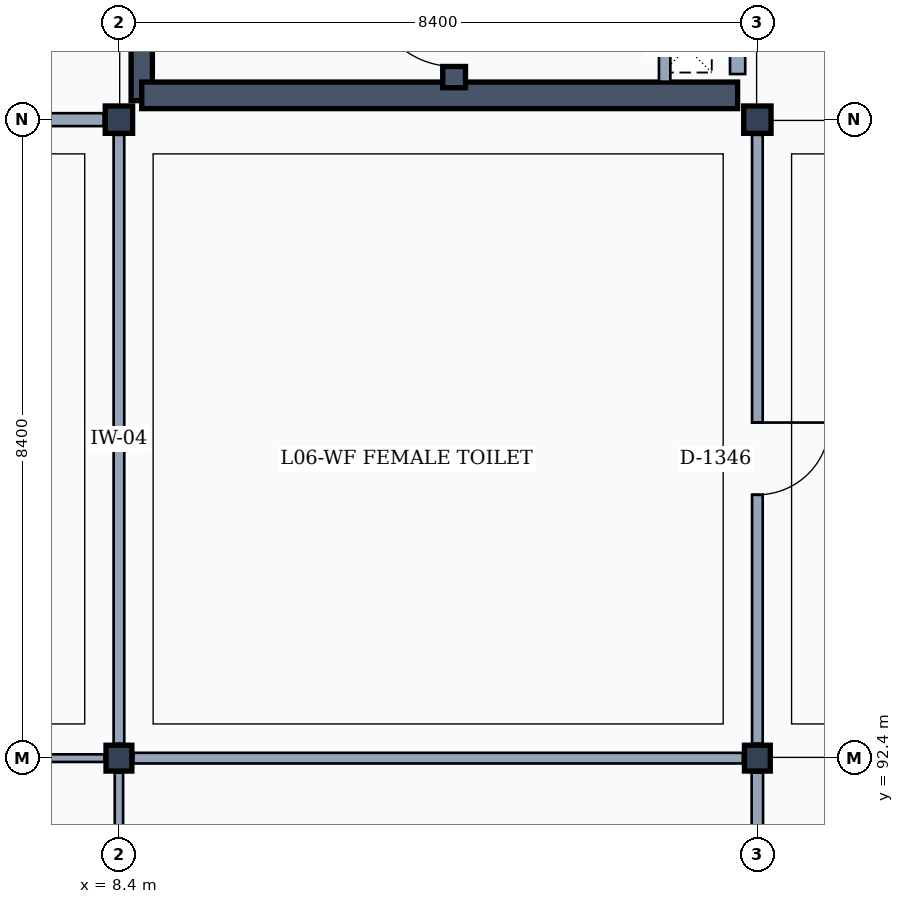
"""IFC4 building model, lengths in metres.
Left out: names, types, materials, properties, quantities, classifications, styles, units other than length and angle.
Written with IfcOpenShell. Run it as: python <this file> out.ifc"""

import sys

from ifc_helpers import new_model, si_unit, direction, frame, frame_2d, origin, origin_2d, place, context, subcontext, project, spatial, rectangle, extrude, element, fill, save


model = new_model("IFC4")
c1 = context("Model", 3, precision=1e-05, world=origin(), true_north=direction((0.0, 1.0)))
c2 = subcontext(c1, "Body", "Model", "MODEL_VIEW")
j1 = project(units=[si_unit("LENGTHUNIT", "METRE"), si_unit("PLANEANGLEUNIT", "RADIAN")], contexts=[c1])
p1 = place(None, origin())
s1 = spatial("IfcSite", under=j1, at=p1, CompositionType="ELEMENT")
p2 = place(p1, origin())
s2 = spatial("IfcBuilding", under=s1, at=p2, CompositionType="ELEMENT")
p3 = place(p2, frame((0.0, 0.0, 26.4)))
s3 = spatial("IfcBuildingStorey", under=s2, at=p3, CompositionType="ELEMENT", Elevation=26.4)
p4 = place(p3, frame((8.4, 92.4, 0.0), z_axis=(0.0, 0.0, 1.0), x_axis=(1.0, 0.0, 0.0)))
e1 = element("IfcColumn", 1, at=p4, inside=s3, PredefinedType="COLUMN", context=c2, shape_type="SweptSolid", body=[
    extrude(rectangle(XDim=0.34, YDim=0.34, at=origin_2d()), origin(), (0.0, 0.0, 1.0), 4.2),
])
p5 = place(p3, frame((8.4, 100.8, 0.0), z_axis=(0.0, 0.0, 1.0), x_axis=(1.0, 0.0, 0.0)))
e2 = element("IfcColumn", 2, at=p5, inside=s3, PredefinedType="COLUMN", context=c2, shape_type="SweptSolid", body=[
    extrude(rectangle(XDim=0.36, YDim=0.36, at=origin_2d()), origin(), (0.0, 0.0, 1.0), 4.2),
])
p6 = place(p3, frame((16.8, 92.4, 0.0), z_axis=(0.0, 0.0, 1.0), x_axis=(1.0, 0.0, 0.0)))
e3 = element("IfcColumn", 3, at=p6, inside=s3, PredefinedType="COLUMN", context=c2, shape_type="SweptSolid", body=[
    extrude(rectangle(XDim=0.34, YDim=0.34, at=origin_2d()), origin(), (0.0, 0.0, 1.0), 4.2),
])
p7 = place(p3, frame((16.8, 100.8, 0.0), z_axis=(0.0, 0.0, 1.0), x_axis=(1.0, 0.0, 0.0)))
e4 = element("IfcColumn", 4, at=p7, inside=s3, PredefinedType="COLUMN", context=c2, shape_type="SweptSolid", body=[
    extrude(rectangle(XDim=0.36, YDim=0.36, at=origin_2d()), origin(), (0.0, 0.0, 1.0), 4.2),
])
p8 = place(p3, frame((8.7, 101.05, 0.0), z_axis=(0.0, 0.0, 1.0), x_axis=(0.0, 1.0, 0.0)))
e5 = element("IfcWall", 5, at=p8, inside=s3, PredefinedType="SHEAR", context=c2, shape_type="SweptSolid", body=[
    extrude(rectangle(XDim=7.94, YDim=0.28, at=frame_2d((3.97, 0.0))), origin(), (0.0, 0.0, 1.0), 3.99),
])
p9 = place(p3, frame((16.54, 108.6, 0.0), z_axis=(0.0, 0.0, 1.0), x_axis=(0.0, -1.0, 0.0)))
e6 = element("IfcWall", 6, at=p9, inside=s3, PredefinedType="PARTITIONING", context=c2, shape_type="SweptSolid", body=[
    extrude(rectangle(XDim=7.2, YDim=0.2, at=frame_2d((3.6, 0.0))), origin(), (0.0, 0.0, 1.0), 3.32),
])
p10 = place(p9, frame((3.55, 0.0, 0.0)))
e7 = element("IfcOpeningElement", 7, at=p10, cuts=e6, PredefinedType="OPENING", context=c2, shape_type="SweptSolid", body=[
    extrude(rectangle(XDim=1.1, YDim=2.15, at=frame_2d((0.55, 1.075))), frame((0.0, 0.11, 0.0), z_axis=(0.0, -1.0, 0.0), x_axis=(1.0, 0.0, 0.0)), (0.0, 0.0, 1.0), 0.22),
])
p11 = place(p3, frame((16.54, 101.12, 0.0), z_axis=(0.0, 0.0, 1.0), x_axis=(-1.0, 0.0, 0.0)))
e8 = element("IfcWall", 8, at=p11, inside=s3, PredefinedType="SHEAR", context=c2, shape_type="SweptSolid", body=[
    extrude(rectangle(XDim=7.84, YDim=0.35, at=frame_2d((3.92, 0.0))), origin(), (0.0, 0.0, 1.0), 3.99),
])
p12 = place(p3, frame((12.81, 101.22, 0.0), z_axis=(0.0, 0.0, 1.0), x_axis=(0.0, 1.0, 0.0)))
e9 = element("IfcWall", 9, at=p12, inside=s3, PredefinedType="SHEAR", context=c2, shape_type="SweptSolid", body=[
    extrude(rectangle(XDim=7.38, YDim=0.3, at=frame_2d((3.69, 0.0))), origin(), (0.0, 0.0, 1.0), 3.99),
])
p13 = place(p12, frame((0.28, 0.0, 0.0)))
e10 = element("IfcOpeningElement", 10, at=p13, cuts=e9, PredefinedType="OPENING", context=c2, shape_type="SweptSolid", body=[
    extrude(rectangle(XDim=1.1, YDim=2.15, at=frame_2d((0.55, 1.075))), frame((0.0, 0.16, 0.0), z_axis=(0.0, -1.0, 0.0), x_axis=(1.0, 0.0, 0.0)), (0.0, 0.0, 1.0), 0.32),
])
p14 = place(p3, frame((15.58, 102.36, 0.0), z_axis=(0.0, 0.0, 1.0), x_axis=(0.0, -1.0, 0.0)))
e11 = element("IfcWall", 11, at=p14, inside=s3, PredefinedType="PARTITIONING", context=c2, shape_type="SweptSolid", body=[
    extrude(rectangle(XDim=1.06, YDim=0.15, at=frame_2d((0.53, 0.0))), origin(), (0.0, 0.0, 1.0), 3.32),
])
p15 = place(p3, frame((8.4, 84.2, 0.0), z_axis=(0.0, 0.0, 1.0), x_axis=(0.0, 1.0, 0.0)))
e12 = element("IfcWall", 12, at=p15, inside=s3, PredefinedType="PARTITIONING", context=c2, shape_type="SweptSolid", body=[
    extrude(rectangle(XDim=8.01, YDim=0.11, at=frame_2d((4.005, 0.0))), origin(), (0.0, 0.0, 1.0), 3.32),
])
p16 = place(p15, frame((3.3, 0.0, 0.0)))
e13 = element("IfcOpeningElement", 13, at=p16, cuts=e12, PredefinedType="OPENING", context=c2, shape_type="SweptSolid", body=[
    extrude(rectangle(XDim=0.9, YDim=2.1, at=frame_2d((0.45, 1.05))), frame((0.0, 0.065, 0.0), z_axis=(0.0, -1.0, 0.0), x_axis=(1.0, 0.0, 0.0)), (0.0, 0.0, 1.0), 0.13),
])
p17 = place(p3, frame((0.19, 92.4, 0.0), z_axis=(0.0, 0.0, 1.0), x_axis=(1.0, 0.0, 0.0)))
e14 = element("IfcWall", 14, at=p17, inside=s3, PredefinedType="MOVABLE", context=c2, shape_type="SweptSolid", body=[
    extrude(rectangle(XDim=8.02, YDim=0.1, at=frame_2d((4.01, 0.0))), origin(), (0.0, 0.0, 1.0), 3.32),
])
p18 = place(p17, frame((3.125, 0.0, 0.0)))
e15 = element("IfcOpeningElement", 15, at=p18, cuts=e14, PredefinedType="OPENING", context=c2, shape_type="SweptSolid", body=[
    extrude(rectangle(XDim=1.25, YDim=2.3, at=frame_2d((0.625, 1.15))), frame((0.0, 0.06, 0.0), z_axis=(0.0, -1.0, 0.0), x_axis=(1.0, 0.0, 0.0)), (0.0, 0.0, 1.0), 0.12),
])
p19 = place(p3, frame((8.4, 92.59, 0.0), z_axis=(0.0, 0.0, 1.0), x_axis=(0.0, 1.0, 0.0)))
e16 = element("IfcWall", 16, at=p19, inside=s3, PredefinedType="PARTITIONING", context=c2, shape_type="SweptSolid", body=[
    extrude(rectangle(XDim=8.01, YDim=0.14, at=frame_2d((4.005, 0.0))), origin(), (0.0, 0.0, 1.0), 3.32),
])
p20 = place(p3, frame((0.2, 100.8, 0.0), z_axis=(0.0, 0.0, 1.0), x_axis=(1.0, 0.0, 0.0)))
e17 = element("IfcWall", 17, at=p20, inside=s3, PredefinedType="PARTITIONING", context=c2, shape_type="SweptSolid", body=[
    extrude(rectangle(XDim=8.0, YDim=0.17, at=frame_2d((4.0, 0.0))), origin(), (0.0, 0.0, 1.0), 3.32),
])
p21 = place(p20, frame((3.075, 0.0, 0.0)))
e18 = element("IfcOpeningElement", 18, at=p21, cuts=e17, PredefinedType="OPENING", context=c2, shape_type="SweptSolid", body=[
    extrude(rectangle(XDim=1.35, YDim=2.25, at=frame_2d((0.675, 1.125))), frame((0.0, 0.095, 0.0), z_axis=(0.0, -1.0, 0.0), x_axis=(1.0, 0.0, 0.0)), (0.0, 0.0, 1.0), 0.19),
])
p22 = place(p3, frame((16.8, 84.2, 0.0), z_axis=(0.0, 0.0, 1.0), x_axis=(0.0, 1.0, 0.0)))
e19 = element("IfcWall", 19, at=p22, inside=s3, PredefinedType="PARTITIONING", context=c2, shape_type="SweptSolid", body=[
    extrude(rectangle(XDim=8.01, YDim=0.15, at=frame_2d((4.005, 0.0))), origin(), (0.0, 0.0, 1.0), 3.32),
])
p23 = place(p22, frame((2.85, 0.0, 0.0)))
e20 = element("IfcOpeningElement", 20, at=p23, cuts=e19, PredefinedType="OPENING", context=c2, shape_type="SweptSolid", body=[
    extrude(rectangle(XDim=1.8, YDim=2.3, at=frame_2d((0.9, 1.15))), frame((0.0, 0.085, 0.0), z_axis=(0.0, -1.0, 0.0), x_axis=(1.0, 0.0, 0.0)), (0.0, 0.0, 1.0), 0.17),
])
p24 = place(p3, frame((8.59, 92.4, 0.0), z_axis=(0.0, 0.0, 1.0), x_axis=(1.0, 0.0, 0.0)))
e21 = element("IfcWall", 21, at=p24, inside=s3, PredefinedType="PARTITIONING", context=c2, shape_type="SweptSolid", body=[
    extrude(rectangle(XDim=8.02, YDim=0.14, at=frame_2d((4.01, 0.0))), origin(), (0.0, 0.0, 1.0), 3.32),
])
p25 = place(p3, frame((16.8, 92.59, 0.0), z_axis=(0.0, 0.0, 1.0), x_axis=(0.0, 1.0, 0.0)))
e22 = element("IfcWall", 22, at=p25, inside=s3, PredefinedType="PARTITIONING", context=c2, shape_type="SweptSolid", body=[
    extrude(rectangle(XDim=8.01, YDim=0.14, at=frame_2d((4.005, 0.0))), origin(), (0.0, 0.0, 1.0), 3.32),
])
p26 = place(p25, frame((3.275, 0.0, 0.0)))
e23 = element("IfcOpeningElement", 23, at=p26, cuts=e22, PredefinedType="OPENING", context=c2, shape_type="SweptSolid", body=[
    extrude(rectangle(XDim=0.95, YDim=2.15, at=frame_2d((0.475, 1.075))), frame((0.0, 0.08, 0.0), z_axis=(0.0, -1.0, 0.0), x_axis=(1.0, 0.0, 0.0)), (0.0, 0.0, 1.0), 0.16),
])
p27 = place(p13, origin())
e24 = element("IfcDoor", 24, at=p27, inside=s3, OperationType="SINGLE_SWING_RIGHT", PredefinedType="DOOR", context=c2, shape_type="SweptSolid", body=[
    extrude(rectangle(XDim=1.1, YDim=2.15, at=frame_2d((0.55, 1.075))), frame((0.0, 0.025, 0.0), z_axis=(0.0, -1.0, 0.0), x_axis=(1.0, 0.0, 0.0)), (0.0, 0.0, 1.0), 0.05),
])
fill(e10, e24)
p28 = place(p26, frame((0.95, 0.0, 0.0), z_axis=(0.0, 0.0, 1.0), x_axis=(-1.0, 0.0, 0.0)))
e25 = element("IfcDoor", 25, at=p28, inside=s3, OperationType="SINGLE_SWING_LEFT", PredefinedType="DOOR", context=c2, shape_type="SweptSolid", body=[
    extrude(rectangle(XDim=0.95, YDim=2.15, at=frame_2d((0.475, 1.075))), frame((0.0, 0.025, 0.0), z_axis=(0.0, -1.0, 0.0), x_axis=(1.0, 0.0, 0.0)), (0.0, 0.0, 1.0), 0.05),
])
fill(e23, e25)
save(model, sys.argv[1])
